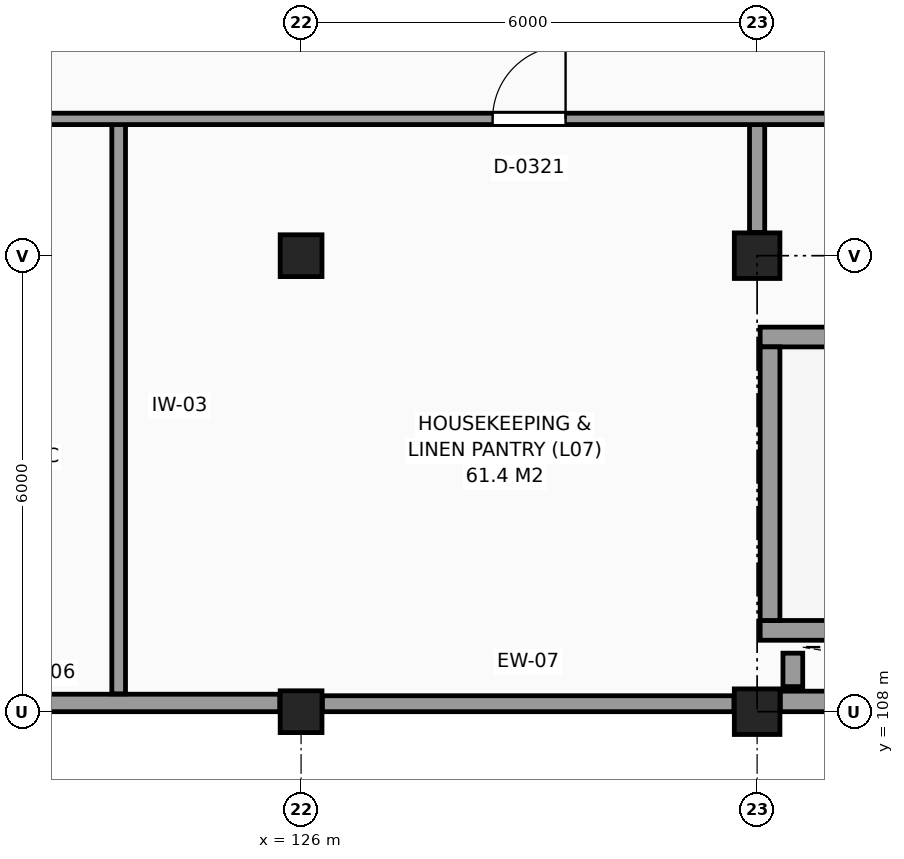
"""IFC4 building model, lengths in metres.
Left out: names, types, materials, properties, quantities, classifications, styles, units other than length and angle.
Written with IfcOpenShell. Run it as: python <this file> out.ifc"""

import sys

from ifc_helpers import new_model, si_unit, direction, frame, frame_2d, origin, origin_2d, place, context, subcontext, project, spatial, rectangle, extrude, element, fill, save


model = new_model("IFC4")
c1 = context("Model", 3, precision=1e-05, world=origin(), true_north=direction((0.0, 1.0)))
c2 = subcontext(c1, "Body", "Model", "MODEL_VIEW")
j1 = project(units=[si_unit("LENGTHUNIT", "METRE"), si_unit("PLANEANGLEUNIT", "RADIAN")], contexts=[c1])
p1 = place(None, origin())
s1 = spatial("IfcSite", under=j1, at=p1, CompositionType="ELEMENT")
p2 = place(p1, origin())
s2 = spatial("IfcBuilding", under=s1, at=p2, CompositionType="ELEMENT")
p3 = place(p2, frame((0.0, 0.0, 31.5)))
s3 = spatial("IfcBuildingStorey", under=s2, at=p3, CompositionType="ELEMENT", Elevation=31.5)
for number, where, z_axis, x_axis in (
    (1, (126.0, 108.0, 0.0), (0.0, 0.0, 1.0), (1.0, 0.0, 0.0)),
    (2, (126.0, 114.0, 0.0), (0.0, 0.0, 1.0), (1.0, 0.0, 0.0)),
):
    element("IfcColumn", number, at=place(p3, frame(where, z_axis=z_axis, x_axis=x_axis)), inside=s3, PredefinedType="COLUMN", context=c2, shape_type="SweptSolid", body=[
        extrude(rectangle(XDim=0.55, YDim=0.55, at=origin_2d()), origin(), (0.0, 0.0, 1.0), 3.3),
    ])
for number, where, z_axis, x_axis in (
    (3, (132.0, 108.0, 0.0), (0.0, 0.0, 1.0), (1.0, 0.0, 0.0)),
    (4, (132.0, 114.0, 0.0), (0.0, 0.0, 1.0), (1.0, 0.0, 0.0)),
):
    element("IfcColumn", number, at=place(p3, frame(where, z_axis=z_axis, x_axis=x_axis)), inside=s3, PredefinedType="COLUMN", context=c2, shape_type="SweptSolid", body=[
        extrude(rectangle(XDim=0.6, YDim=0.6, at=origin_2d()), origin(), (0.0, 0.0, 1.0), 3.3),
    ])
p4 = place(p3, frame((120.305, 108.115, 0.0), z_axis=(0.0, 0.0, 1.0), x_axis=(1.0, 0.0, 0.0)))
e5 = element("IfcWall", 5, at=p4, inside=s3, PredefinedType="SOLIDWALL", context=c2, shape_type="SweptSolid", body=[
    extrude(rectangle(XDim=5.415, YDim=0.23, at=frame_2d((2.708, 0.0))), origin(), (0.0, 0.0, 1.0), 2.42),
])
p5 = place(p3, frame((126.28, 108.105, 0.0), z_axis=(0.0, 0.0, 1.0), x_axis=(1.0, 0.0, 0.0)))
e6 = element("IfcWall", 6, at=p5, inside=s3, PredefinedType="SOLIDWALL", context=c2, shape_type="SweptSolid", body=[
    extrude(rectangle(XDim=5.415, YDim=0.21, at=frame_2d((2.708, 0.0))), origin(), (0.0, 0.0, 1.0), 2.42),
])
p6 = place(p3, frame((132.305, 108.135, 0.0), z_axis=(0.0, 0.0, 1.0), x_axis=(1.0, 0.0, 0.0)))
e7 = element("IfcWall", 7, at=p6, inside=s3, PredefinedType="SOLIDWALL", context=c2, shape_type="SweptSolid", body=[
    extrude(rectangle(XDim=5.415, YDim=0.27, at=frame_2d((2.708, 0.0))), origin(), (0.0, 0.0, 1.0), 3.07),
])
for number, where, z_axis, x_axis in (
    (8, (132.04, 109.07, 0.0), (0.0, 0.0, 1.0), (1.0, 0.0, 0.0)),
    (9, (132.04, 112.93, 0.0), (0.0, 0.0, 1.0), (1.0, 0.0, 0.0)),
):
    element("IfcWall", number, at=place(p3, frame(where, z_axis=z_axis, x_axis=x_axis)), inside=s3, PredefinedType="SHEAR", context=c2, shape_type="SweptSolid", body=[
        extrude(rectangle(XDim=10.72, YDim=0.26, at=frame_2d((5.36, 0.0))), origin(), (0.0, 0.0, 1.0), 3.3),
    ])
p7 = place(p3, frame((132.17, 109.2, 0.0), z_axis=(0.0, 0.0, 1.0), x_axis=(0.0, 1.0, 0.0)))
e10 = element("IfcWall", 10, at=p7, inside=s3, PredefinedType="SHEAR", context=c2, shape_type="SweptSolid", body=[
    extrude(rectangle(XDim=3.6, YDim=0.26, at=frame_2d((1.8, 0.0))), origin(), (0.0, 0.0, 1.0), 3.3),
])
p8 = place(p3, frame((132.47, 108.33, 0.0), z_axis=(0.0, 0.0, 1.0), x_axis=(0.0, 1.0, 0.0)))
e11 = element("IfcWall", 11, at=p8, inside=s3, PredefinedType="SHEAR", context=c2, shape_type="SweptSolid", body=[
    extrude(rectangle(XDim=0.44, YDim=0.26, at=frame_2d((0.22, 0.0))), origin(), (0.0, 0.0, 1.0), 3.3),
])
p9 = place(p3, frame((123.6, 108.235, 0.0), z_axis=(0.0, 0.0, 1.0), x_axis=(0.0, 1.0, 0.0)))
e12 = element("IfcWall", 12, at=p9, inside=s3, PredefinedType="PARTITIONING", context=c2, shape_type="SweptSolid", body=[
    extrude(rectangle(XDim=7.565, YDim=0.18, at=frame_2d((3.782, 0.0))), origin(), (0.0, 0.0, 1.0), 3.07),
])
p10 = place(p3, frame((132.0, 114.305, 0.0), z_axis=(0.0, 0.0, 1.0), x_axis=(0.0, 1.0, 0.0)))
e13 = element("IfcWall", 13, at=p10, inside=s3, PredefinedType="PARTITIONING", context=c2, shape_type="SweptSolid", body=[
    extrude(rectangle(XDim=1.495, YDim=0.2, at=frame_2d((0.748, 0.0))), origin(), (0.0, 0.0, 1.0), 2.27),
])
p11 = place(p3, frame((66.215, 115.8, 0.0), z_axis=(0.0, 0.0, 1.0), x_axis=(1.0, 0.0, 0.0)))
e14 = element("IfcWall", 14, at=p11, inside=s3, PredefinedType="PARTITIONING", context=c2, shape_type="SweptSolid", body=[
    extrude(rectangle(XDim=103.585, YDim=0.15, at=frame_2d((51.792, 0.0))), origin(), (0.0, 0.0, 1.0), 3.07),
])
p12 = place(p11, frame((80.185, 0.0, 0.0)))
e15 = element("IfcOpeningElement", 15, at=p12, cuts=e14, PredefinedType="OPENING", context=c2, shape_type="SweptSolid", body=[
    extrude(rectangle(XDim=1.2, YDim=2.2, at=frame_2d((0.6, 1.1))), frame((0.0, 0.085, 0.0), z_axis=(0.0, -1.0, 0.0), x_axis=(1.0, 0.0, 0.0)), (0.0, 0.0, 1.0), 0.17),
])
p13 = place(p11, frame((50.185, 0.0, 0.0)))
e16 = element("IfcOpeningElement", 16, at=p13, cuts=e14, PredefinedType="OPENING", context=c2, shape_type="SweptSolid", body=[
    extrude(rectangle(XDim=1.2, YDim=2.2, at=frame_2d((0.6, 1.1))), frame((0.0, 0.085, 0.0), z_axis=(0.0, -1.0, 0.0), x_axis=(1.0, 0.0, 0.0)), (0.0, 0.0, 1.0), 0.17),
])
p14 = place(p11, frame((9.035, 0.0, 0.0)))
e17 = element("IfcOpeningElement", 17, at=p14, cuts=e14, PredefinedType="OPENING", context=c2, shape_type="SweptSolid", body=[
    extrude(rectangle(XDim=1.1, YDim=2.15, at=frame_2d((0.55, 1.075))), frame((0.0, 0.085, 0.0), z_axis=(0.0, -1.0, 0.0), x_axis=(1.0, 0.0, 0.0)), (0.0, 0.0, 1.0), 0.17),
])
p15 = place(p11, frame((55.335, 0.0, 0.0)))
e18 = element("IfcOpeningElement", 18, at=p15, cuts=e14, PredefinedType="OPENING", context=c2, shape_type="SweptSolid", body=[
    extrude(rectangle(XDim=1.0, YDim=2.15, at=frame_2d((0.5, 1.075))), frame((0.0, 0.085, 0.0), z_axis=(0.0, -1.0, 0.0), x_axis=(1.0, 0.0, 0.0)), (0.0, 0.0, 1.0), 0.17),
])
p16 = place(p11, frame((62.305, 0.0, 0.0)))
e19 = element("IfcOpeningElement", 19, at=p16, cuts=e14, PredefinedType="OPENING", context=c2, shape_type="SweptSolid", body=[
    extrude(rectangle(XDim=0.96, YDim=2.15, at=frame_2d((0.48, 1.075))), frame((0.0, 0.085, 0.0), z_axis=(0.0, -1.0, 0.0), x_axis=(1.0, 0.0, 0.0)), (0.0, 0.0, 1.0), 0.17),
])
p17 = place(p11, frame((31.985, 0.0, 0.0)))
e20 = element("IfcOpeningElement", 20, at=p17, cuts=e14, PredefinedType="OPENING", context=c2, shape_type="SweptSolid", body=[
    extrude(rectangle(XDim=1.6, YDim=2.25, at=frame_2d((0.8, 1.125))), frame((0.0, 0.085, 0.0), z_axis=(0.0, -1.0, 0.0), x_axis=(1.0, 0.0, 0.0)), (0.0, 0.0, 1.0), 0.17),
])
p18 = place(p11, frame((18.61, 0.0, 0.0)))
e21 = element("IfcOpeningElement", 21, at=p18, cuts=e14, PredefinedType="OPENING", context=c2, shape_type="SweptSolid", body=[
    extrude(rectangle(XDim=0.95, YDim=2.1, at=frame_2d((0.475, 1.05))), frame((0.0, 0.085, 0.0), z_axis=(0.0, -1.0, 0.0), x_axis=(1.0, 0.0, 0.0)), (0.0, 0.0, 1.0), 0.17),
])
p19 = place(p11, frame((84.51, 0.0, 0.0)))
e22 = element("IfcOpeningElement", 22, at=p19, cuts=e14, PredefinedType="OPENING", context=c2, shape_type="SweptSolid", body=[
    extrude(rectangle(XDim=0.95, YDim=2.1, at=frame_2d((0.475, 1.05))), frame((0.0, 0.085, 0.0), z_axis=(0.0, -1.0, 0.0), x_axis=(1.0, 0.0, 0.0)), (0.0, 0.0, 1.0), 0.17),
])
p20 = place(p16, origin())
e23 = element("IfcDoor", 23, at=p20, inside=s3, OperationType="SINGLE_SWING_RIGHT", PredefinedType="DOOR", context=c2, shape_type="SweptSolid", body=[
    extrude(rectangle(XDim=0.96, YDim=2.15, at=frame_2d((0.48, 1.075))), frame((0.0, 0.025, 0.0), z_axis=(0.0, -1.0, 0.0), x_axis=(1.0, 0.0, 0.0)), (0.0, 0.0, 1.0), 0.05),
])
fill(e19, e23)
save(model, sys.argv[1])
